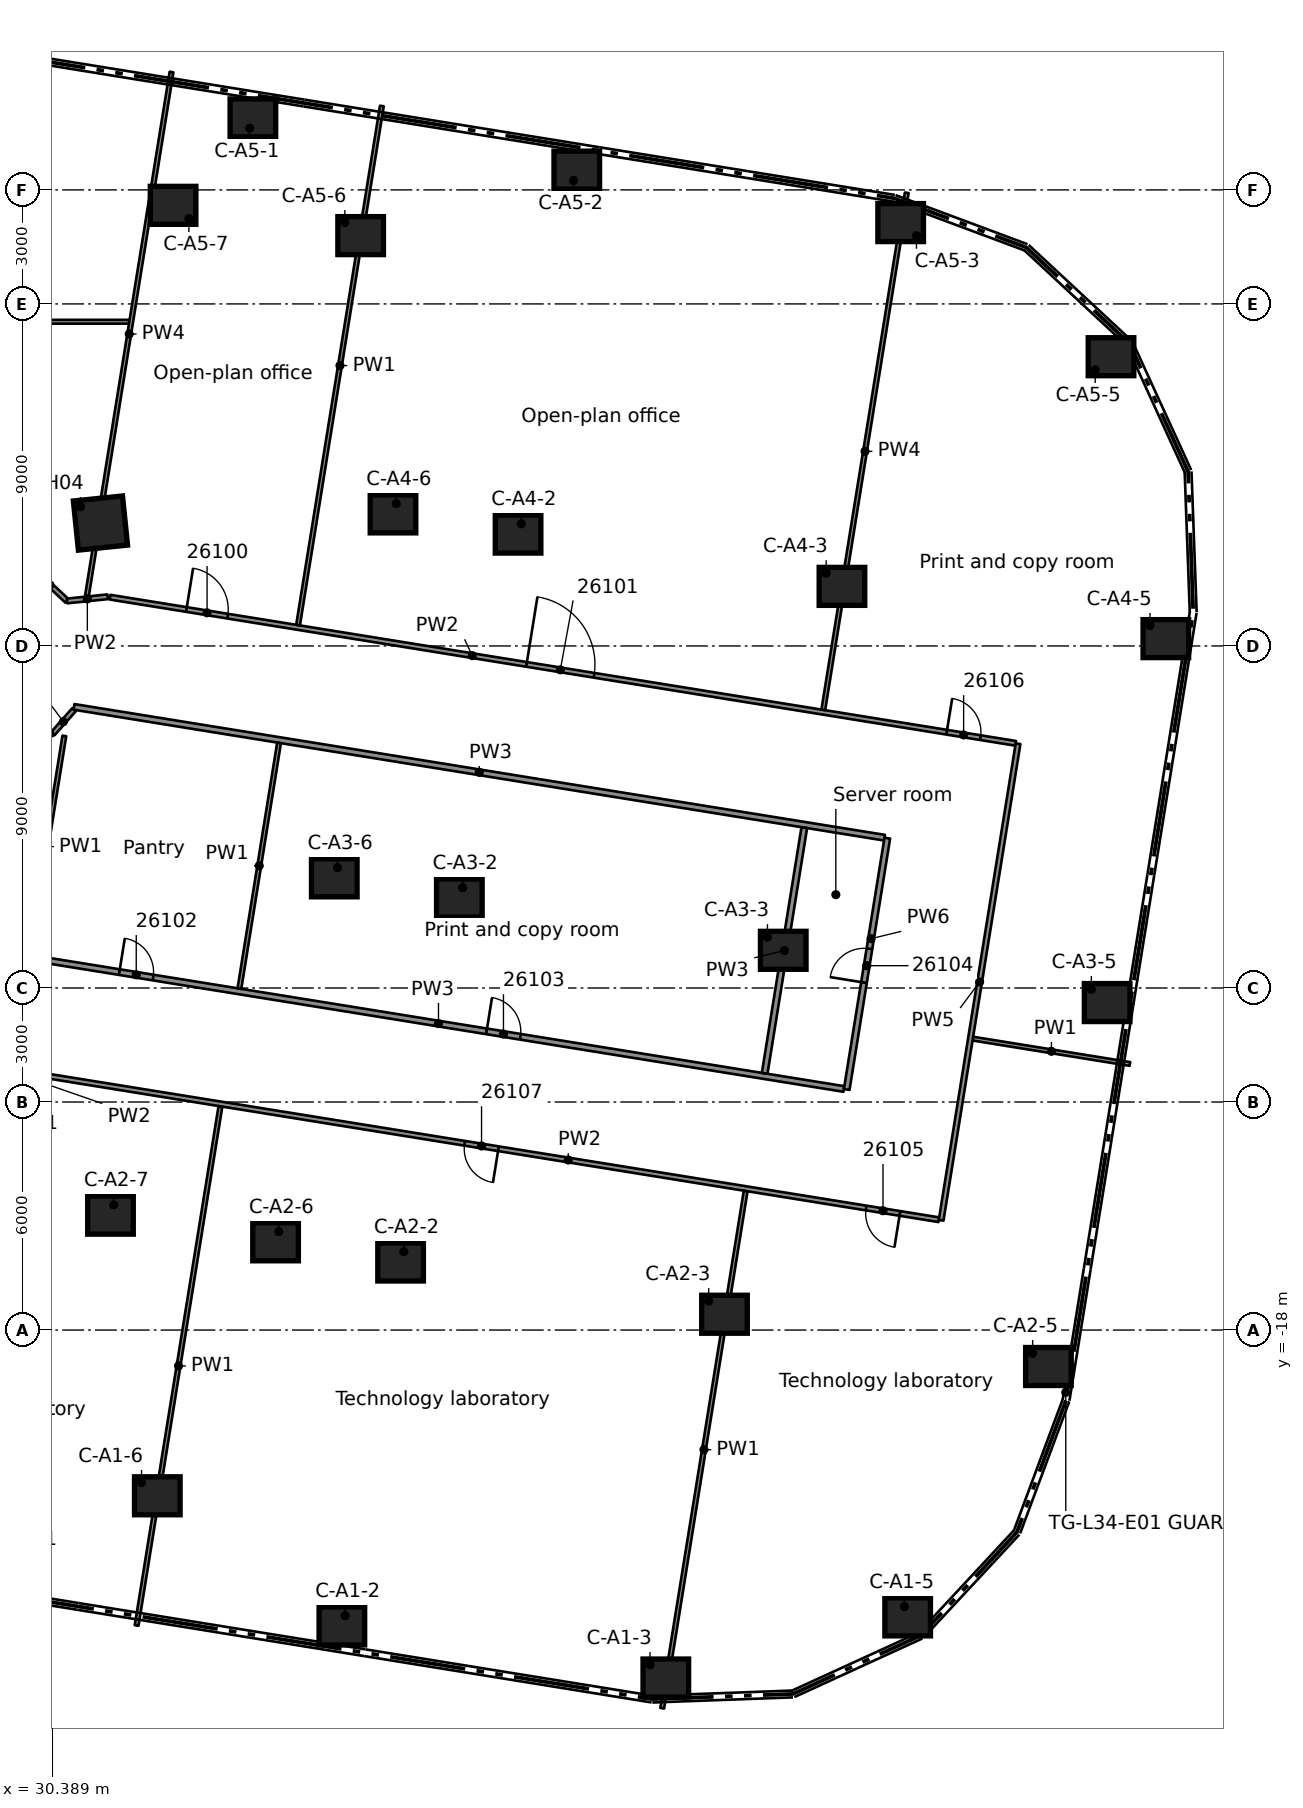
"""IFC4 building model, lengths in metres.
Left out: names, types, materials, properties, quantities, classifications, styles, units other than length and angle.
Written with IfcOpenShell. Run it as: python <this file> out.ifc"""

import sys

from ifc_helpers import new_model, si_unit, direction, frame, frame_2d, origin, origin_2d, place, context, subcontext, project, spatial, rectangle, extrude, element, fill, save


model = new_model("IFC4")
c1 = context("Model", 3, precision=1e-05, world=origin(), true_north=direction((0.0, 1.0)))
c2 = subcontext(c1, "Body", "Model", "MODEL_VIEW")
j1 = project(units=[si_unit("LENGTHUNIT", "METRE"), si_unit("PLANEANGLEUNIT", "RADIAN")], contexts=[c1])
p1 = place(None, origin())
s1 = spatial("IfcSite", under=j1, at=p1, CompositionType="ELEMENT")
p2 = place(p1, origin())
s2 = spatial("IfcBuilding", under=s1, at=p2, CompositionType="ELEMENT")
p3 = place(p2, frame((0.0, 0.0, 134.2)))
s3 = spatial("IfcBuildingStorey", under=s2, at=p3, CompositionType="ELEMENT", Elevation=134.2)
for number, where, z_axis, x_axis in (
    (1, (38.011, -25.785, 0.0), (0.0, 0.0, 1.0), (1.0, 0.0, 0.0)),
    (2, (46.535, -27.156, 0.0), (0.0, 0.0, 1.0), (1.0, 0.0, 0.0)),
    (3, (52.899, -25.547, 0.0), (0.0, 0.0, 1.0), (1.0, 0.0, 0.0)),
    (4, (33.154, -22.361, 0.0), (0.0, 0.0, 1.0), (1.0, 0.0, 0.0)),
    (5, (39.556, -16.209, 0.0), (0.0, 0.0, 1.0), (1.0, 0.0, 0.0)),
    (6, (48.079, -17.584, 0.0), (0.0, 0.0, 1.0), (1.0, 0.0, 0.0)),
    (7, (56.603, -18.959, 0.0), (0.0, 0.0, 1.0), (1.0, 0.0, 0.0)),
    (8, (36.266, -15.678, 0.0), (0.0, 0.0, 1.0), (1.0, 0.0, 0.0)),
    (9, (31.922, -14.977, 0.0), (0.0, 0.0, 1.0), (1.0, 0.0, 0.0)),
    (10, (41.102, -6.632, 0.0), (0.0, 0.0, 1.0), (1.0, 0.0, 0.0)),
    (11, (49.625, -8.008, 0.0), (0.0, 0.0, 1.0), (1.0, 0.0, 0.0)),
    (12, (58.148, -9.383, 0.0), (0.0, 0.0, 1.0), (1.0, 0.0, 0.0)),
    (13, (37.811, -6.101, 0.0), (0.0, 0.0, 1.0), (1.0, 0.0, 0.0)),
    (14, (42.647, 2.944, 0.0), (0.0, 0.0, 1.0), (1.0, 0.0, 0.0)),
    (15, (51.17, 1.568, 0.0), (0.0, 0.0, 1.0), (1.0, 0.0, 0.0)),
    (16, (59.693, 0.193, 0.0), (0.0, 0.0, 1.0), (1.0, 0.0, 0.0)),
    (17, (39.356, 3.475, 0.0), (0.0, 0.0, 1.0), (1.0, 0.0, 0.0)),
    (18, (35.669, 13.895, 0.0), (0.0, 0.0, 1.0), (1.0, 0.0, 0.0)),
    (19, (44.192, 12.52, 0.0), (0.0, 0.0, 1.0), (1.0, 0.0, 0.0)),
    (20, (52.715, 11.14, 0.0), (0.0, 0.0, 1.0), (1.0, 0.0, 0.0)),
    (21, (58.25, 7.611, 0.0), (0.0, 0.0, 1.0), (1.0, 0.0, 0.0)),
    (22, (38.505, 10.797, 0.0), (0.0, 0.0, 1.0), (1.0, 0.0, 0.0)),
    (23, (33.569, 11.594, 0.0), (0.0, 0.0, 1.0), (1.0, 0.0, 0.0)),
):
    element("IfcColumn", number, at=place(p3, frame(where, z_axis=z_axis, x_axis=x_axis)), inside=s3, PredefinedType="COLUMN", context=c2, shape_type="SweptSolid", body=[
        extrude(rectangle(XDim=1.2, YDim=1.0, at=origin_2d()), origin(), (0.0, 0.0, 1.0), 3.5),
    ])
p4 = place(p3, frame((31.658, 3.234, 0.0), z_axis=(0.0, 0.0, 1.0), x_axis=(0.994822339568, 0.101629290543, 0.0)))
e24 = element("IfcColumn", 24, at=p4, inside=s3, PredefinedType="COLUMN", context=c2, shape_type="SweptSolid", body=[
    extrude(rectangle(XDim=1.3, YDim=1.3, at=origin_2d()), origin(), (0.0, 0.0, 1.0), 3.5),
])
p5 = place(p3, frame((29.883, 2.025, 0.0), z_axis=(0.0, 0.0, 1.0), x_axis=(0.729202519841, -0.684297950499, 0.0)))
e25 = element("IfcWall", 25, at=p5, inside=s3, PredefinedType="PARTITIONING", context=c2, shape_type="SweptSolid", body=[
    extrude(rectangle(XDim=1.229, YDim=0.125, at=frame_2d((0.614, 0.0))), origin(), (0.0, 0.0, 1.0), 3.03),
])
p6 = place(p3, frame((30.962, -1.678, 0.0), z_axis=(0.0, 0.0, 1.0), x_axis=(-0.66286801914, -0.748736261444, 0.0)))
e26 = element("IfcWall", 26, at=p6, inside=s3, PredefinedType="PARTITIONING", context=c2, shape_type="SweptSolid", body=[
    extrude(rectangle(XDim=0.842, YDim=0.125, at=frame_2d((0.421, 0.0))), origin(), (0.0, 0.0, 1.0), 3.03),
])
p7 = place(p3, frame((53.72, -15.097, 0.0), z_axis=(0.0, 0.0, 1.0), x_axis=(-0.987256807208, 0.159135152063, 0.0)))
e27 = element("IfcWall", 27, at=p7, inside=s3, PredefinedType="PARTITIONING", context=c2, shape_type="SweptSolid", body=[
    extrude(rectangle(XDim=24.696, YDim=0.125, at=frame_2d((12.348, 0.0))), origin(), (0.0, 0.0, 1.0), 3.03),
])
p8 = place(p7, frame((1.039, 0.0, 0.0)))
e28 = element("IfcOpeningElement", 28, at=p8, cuts=e27, PredefinedType="OPENING", context=c2, shape_type="SweptSolid", body=[
    extrude(rectangle(XDim=0.9, YDim=2.1, at=frame_2d((0.45, 1.05))), frame((0.0, 0.073, 0.0), z_axis=(0.0, -1.0, 0.0), x_axis=(1.0, 0.0, 0.0)), (0.0, 0.0, 1.0), 0.145),
])
p9 = place(p7, frame((11.739, 0.0, 0.0)))
e29 = element("IfcOpeningElement", 29, at=p9, cuts=e27, PredefinedType="OPENING", context=c2, shape_type="SweptSolid", body=[
    extrude(rectangle(XDim=0.9, YDim=2.1, at=frame_2d((0.45, 1.05))), frame((0.0, 0.073, 0.0), z_axis=(0.0, -1.0, 0.0), x_axis=(1.0, 0.0, 0.0)), (0.0, 0.0, 1.0), 0.145),
])
p10 = place(p3, frame((29.885, -8.215, 0.0), z_axis=(0.0, 0.0, 1.0), x_axis=(0.987236652076, -0.1592601419, 0.0)))
e30 = element("IfcWall", 30, at=p10, inside=s3, PredefinedType="PARTITIONING", context=c2, shape_type="SweptSolid", body=[
    extrude(rectangle(XDim=21.612, YDim=0.15, at=frame_2d((10.806, 0.0))), origin(), (0.0, 0.0, 1.0), 3.03),
])
p11 = place(p10, frame((2.3, 0.0, 0.0)))
e31 = element("IfcOpeningElement", 31, at=p11, cuts=e30, PredefinedType="OPENING", context=c2, shape_type="SweptSolid", body=[
    extrude(rectangle(XDim=0.9, YDim=2.1, at=frame_2d((0.45, 1.05))), frame((0.0, 0.085, 0.0), z_axis=(0.0, -1.0, 0.0), x_axis=(1.0, 0.0, 0.0)), (0.0, 0.0, 1.0), 0.17),
])
p12 = place(p10, frame((12.088, 0.0, 0.0)))
e32 = element("IfcOpeningElement", 32, at=p12, cuts=e30, PredefinedType="OPENING", context=c2, shape_type="SweptSolid", body=[
    extrude(rectangle(XDim=0.9, YDim=2.1, at=frame_2d((0.45, 1.05))), frame((0.0, 0.085, 0.0), z_axis=(0.0, -1.0, 0.0), x_axis=(1.0, 0.0, 0.0)), (0.0, 0.0, 1.0), 0.17),
])
p13 = place(p3, frame((54.615, -10.332, 0.0), z_axis=(0.0, 0.0, 1.0), x_axis=(0.987227218169, -0.15931861067, 0.0)))
e33 = element("IfcWall", 33, at=p13, inside=s3, PredefinedType="PARTITIONING", context=c2, shape_type="SweptSolid", body=[
    extrude(rectangle(XDim=4.187, YDim=0.1, at=frame_2d((2.093, 0.0))), origin(), (0.0, 0.0, 1.0), 3.03),
])
p14 = place(p3, frame((30.961, -1.603, 0.0), z_axis=(0.0, 0.0, 1.0), x_axis=(0.987228625593, -0.159309889241, 0.0)))
e34 = element("IfcWall", 34, at=p14, inside=s3, PredefinedType="PARTITIONING", context=c2, shape_type="SweptSolid", body=[
    extrude(rectangle(XDim=21.605, YDim=0.15, at=frame_2d((10.802, 0.0))), origin(), (0.0, 0.0, 1.0), 3.03),
])
p15 = place(p3, frame((31.909, 1.284, 0.0), z_axis=(0.0, 0.0, 1.0), x_axis=(0.987227629246, -0.159316063386, 0.0)))
e35 = element("IfcWall", 35, at=p15, inside=s3, PredefinedType="PARTITIONING", context=c2, shape_type="SweptSolid", body=[
    extrude(rectangle(XDim=24.14, YDim=0.125, at=frame_2d((12.07, 0.0))), origin(), (0.0, 0.0, 1.0), 3.03),
])
p16 = place(p15, frame((2.038, 0.0, 0.0)))
e36 = element("IfcOpeningElement", 36, at=p16, cuts=e35, PredefinedType="OPENING", context=c2, shape_type="SweptSolid", body=[
    extrude(rectangle(XDim=1.1, YDim=2.1, at=frame_2d((0.55, 1.05))), frame((0.0, 0.073, 0.0), z_axis=(0.0, -1.0, 0.0), x_axis=(1.0, 0.0, 0.0)), (0.0, 0.0, 1.0), 0.145),
])
p17 = place(p15, frame((11.103, 0.0, 0.0)))
e37 = element("IfcOpeningElement", 37, at=p17, cuts=e35, PredefinedType="OPENING", context=c2, shape_type="SweptSolid", body=[
    extrude(rectangle(XDim=1.8, YDim=2.1, at=frame_2d((0.9, 1.05))), frame((0.0, 0.073, 0.0), z_axis=(0.0, -1.0, 0.0), x_axis=(1.0, 0.0, 0.0)), (0.0, 0.0, 1.0), 0.145),
])
p18 = place(p15, frame((22.303, 0.0, 0.0)))
e38 = element("IfcOpeningElement", 38, at=p18, cuts=e35, PredefinedType="OPENING", context=c2, shape_type="SweptSolid", body=[
    extrude(rectangle(XDim=0.9, YDim=2.1, at=frame_2d((0.45, 1.05))), frame((0.0, 0.073, 0.0), z_axis=(0.0, -1.0, 0.0), x_axis=(1.0, 0.0, 0.0)), (0.0, 0.0, 1.0), 0.145),
])
p19 = place(p3, frame((22.113, 8.531, 0.0), z_axis=(0.0, 0.0, 1.0), x_axis=(1.0, 0.0, 0.0)))
e39 = element("IfcWall", 39, at=p19, inside=s3, PredefinedType="PARTITIONING", context=c2, shape_type="SweptSolid", body=[
    extrude(rectangle(XDim=10.304, YDim=0.1, at=frame_2d((5.152, 0.0))), origin(), (0.0, 0.0, 1.0), 3.03),
])
p20 = place(p3, frame((22.113, -2.386, 0.0), z_axis=(0.0, 0.0, 1.0), x_axis=(0.9999558849, 0.009392989614, 0.0)))
e40 = element("IfcWall", 40, at=p20, inside=s3, PredefinedType="PARTITIONING", context=c2, shape_type="SweptSolid", body=[
    extrude(rectangle(XDim=8.291, YDim=0.125, at=frame_2d((4.146, 0.0))), origin(), (0.0, 0.0, 1.0), 3.03),
])
p21 = place(p3, frame((31.847, 1.294, 0.0), z_axis=(0.0, 0.0, 1.0), x_axis=(-0.994749429213, -0.102340476256, 0.0)))
e41 = element("IfcWall", 41, at=p21, inside=s3, PredefinedType="PARTITIONING", context=c2, shape_type="SweptSolid", body=[
    extrude(rectangle(XDim=1.073, YDim=0.125, at=frame_2d((0.537, 0.0))), origin(), (0.0, 0.0, 1.0), 3.03),
])
p22 = place(p3, frame((53.78, -15.111, 0.0), z_axis=(0.0, 0.0, 1.0), x_axis=(0.159347260632, 0.987222594215, 0.0)))
e42 = element("IfcWall", 42, at=p22, inside=s3, PredefinedType="PARTITIONING", context=c2, shape_type="SweptSolid", body=[
    extrude(rectangle(XDim=12.701, YDim=0.125, at=frame_2d((6.351, 0.0))), origin(), (0.0, 0.0, 1.0), 2.419),
])
p23 = place(p3, frame((51.295, -11.67, 0.0), z_axis=(0.0, 0.0, 1.0), x_axis=(0.159450148398, 0.987205981635, 0.0)))
e43 = element("IfcWall", 43, at=p23, inside=s3, PredefinedType="PARTITIONING", context=c2, shape_type="SweptSolid", body=[
    extrude(rectangle(XDim=6.699, YDim=0.15, at=frame_2d((3.349, 0.0))), origin(), (0.0, 0.0, 1.0), 2.419),
])
p24 = place(p23, frame((2.85, 0.0, 0.0)))
e44 = element("IfcOpeningElement", 44, at=p24, cuts=e43, PredefinedType="OPENING", context=c2, shape_type="SweptSolid", body=[
    extrude(rectangle(XDim=0.9, YDim=2.1, at=frame_2d((0.45, 1.05))), frame((0.0, 0.085, 0.0), z_axis=(0.0, -1.0, 0.0), x_axis=(1.0, 0.0, 0.0)), (0.0, 0.0, 1.0), 0.17),
])
p25 = place(p3, frame((46.44, -27.951, 0.0), z_axis=(0.0, 0.0, 1.0), x_axis=(0.159329896372, 0.987225396818, 0.0)))
e45 = element("IfcWall", 45, at=p25, inside=s3, PredefinedType="PARTITIONING", context=c2, shape_type="SweptSolid", body=[
    extrude(rectangle(XDim=13.783, YDim=0.1, at=frame_2d((6.892, 0.0))), origin(), (0.0, 0.0, 1.0), 3.03),
])
p26 = place(p3, frame((49.136, -11.246, 0.0), z_axis=(0.0, 0.0, 1.0), x_axis=(0.159264085933, 0.98723601582, 0.0)))
e46 = element("IfcWall", 46, at=p26, inside=s3, PredefinedType="PARTITIONING", context=c2, shape_type="SweptSolid", body=[
    extrude(rectangle(XDim=6.549, YDim=0.15, at=frame_2d((3.274, 0.0))), origin(), (0.0, 0.0, 1.0), 3.03),
])
p27 = place(p3, frame((50.679, -1.682, 0.0), z_axis=(0.0, 0.0, 1.0), x_axis=(0.159341041875, 0.987223597963, 0.0)))
e47 = element("IfcWall", 47, at=p27, inside=s3, PredefinedType="PARTITIONING", context=c2, shape_type="SweptSolid", body=[
    extrude(rectangle(XDim=13.782, YDim=0.1, at=frame_2d((6.891, 0.0))), origin(), (0.0, 0.0, 1.0), 2.395),
])
p28 = place(p3, frame((32.61, -25.774, 0.0), z_axis=(0.0, 0.0, 1.0), x_axis=(0.159346714874, 0.987222682306, 0.0)))
e48 = element("IfcWall", 48, at=p28, inside=s3, PredefinedType="PARTITIONING", context=c2, shape_type="SweptSolid", body=[
    extrude(rectangle(XDim=13.837, YDim=0.1, at=frame_2d((6.918, 0.0))), origin(), (0.0, 0.0, 1.0), 3.03),
])
p29 = place(p3, frame((35.315, -9.015, 0.0), z_axis=(0.0, 0.0, 1.0), x_axis=(0.159269947871, 0.987235070135, 0.0)))
e49 = element("IfcWall", 49, at=p29, inside=s3, PredefinedType="PARTITIONING", context=c2, shape_type="SweptSolid", body=[
    extrude(rectangle(XDim=6.548, YDim=0.1, at=frame_2d((3.274, 0.0))), origin(), (0.0, 0.0, 1.0), 3.03),
])
p30 = place(p3, frame((36.858, 0.549, 0.0), z_axis=(0.0, 0.0, 1.0), x_axis=(0.159375015721, 0.987218113876, 0.0)))
e50 = element("IfcWall", 50, at=p30, inside=s3, PredefinedType="PARTITIONING", context=c2, shape_type="SweptSolid", body=[
    extrude(rectangle(XDim=13.836, YDim=0.1, at=frame_2d((6.918, 0.0))), origin(), (0.0, 0.0, 1.0), 3.03),
])
p31 = place(p3, frame((29.769, -8.19, 0.0), z_axis=(0.0, 0.0, 1.0), x_axis=(0.159194698691, 0.987247207091, 0.0)))
e51 = element("IfcWall", 51, at=p31, inside=s3, PredefinedType="PARTITIONING", context=c2, shape_type="SweptSolid", body=[
    extrude(rectangle(XDim=5.898, YDim=0.1, at=frame_2d((2.949, 0.0))), origin(), (0.0, 0.0, 1.0), 3.03),
])
p32 = place(p3, frame((31.302, 1.314, 0.0), z_axis=(0.0, 0.0, 1.0), x_axis=(0.159396223654, 0.987214689865, 0.0)))
e52 = element("IfcWall", 52, at=p32, inside=s3, PredefinedType="PARTITIONING", context=c2, shape_type="SweptSolid", body=[
    extrude(rectangle(XDim=13.966, YDim=0.1, at=frame_2d((6.983, 0.0))), origin(), (0.0, 0.0, 1.0), 2.395),
])
p33 = place(p16, origin())
e53 = element("IfcDoor", 53, at=p33, inside=s3, OperationType="SINGLE_SWING_LEFT", PredefinedType="DOOR", context=c2, shape_type="SweptSolid", body=[
    extrude(rectangle(XDim=1.1, YDim=2.1, at=frame_2d((0.55, 1.05))), frame((0.0, 0.025, 0.0), z_axis=(0.0, -1.0, 0.0), x_axis=(1.0, 0.0, 0.0)), (0.0, 0.0, 1.0), 0.05),
])
fill(e36, e53)
p34 = place(p17, origin())
e54 = element("IfcDoor", 54, at=p34, inside=s3, OperationType="DOUBLE_DOOR_SINGLE_SWING", PredefinedType="DOOR", context=c2, shape_type="SweptSolid", body=[
    extrude(rectangle(XDim=1.8, YDim=2.1, at=frame_2d((0.9, 1.05))), frame((0.0, 0.025, 0.0), z_axis=(0.0, -1.0, 0.0), x_axis=(1.0, 0.0, 0.0)), (0.0, 0.0, 1.0), 0.05),
])
fill(e37, e54)
p35 = place(p11, origin())
e55 = element("IfcDoor", 55, at=p35, inside=s3, OperationType="SINGLE_SWING_LEFT", PredefinedType="DOOR", context=c2, shape_type="SweptSolid", body=[
    extrude(rectangle(XDim=0.9, YDim=2.1, at=frame_2d((0.45, 1.05))), frame((0.0, 0.025, 0.0), z_axis=(0.0, -1.0, 0.0), x_axis=(1.0, 0.0, 0.0)), (0.0, 0.0, 1.0), 0.05),
])
fill(e31, e55)
p36 = place(p12, origin())
e56 = element("IfcDoor", 56, at=p36, inside=s3, OperationType="SINGLE_SWING_RIGHT", PredefinedType="DOOR", context=c2, shape_type="SweptSolid", body=[
    extrude(rectangle(XDim=0.9, YDim=2.1, at=frame_2d((0.45, 1.05))), frame((0.0, 0.025, 0.0), z_axis=(0.0, -1.0, 0.0), x_axis=(1.0, 0.0, 0.0)), (0.0, 0.0, 1.0), 0.05),
])
fill(e32, e56)
p37 = place(p24, origin())
e57 = element("IfcDoor", 57, at=p37, inside=s3, OperationType="SINGLE_SWING_LEFT", PredefinedType="DOOR", context=c2, shape_type="SweptSolid", body=[
    extrude(rectangle(XDim=0.9, YDim=2.1, at=frame_2d((0.45, 1.05))), frame((0.0, 0.025, 0.0), z_axis=(0.0, -1.0, 0.0), x_axis=(1.0, 0.0, 0.0)), (0.0, 0.0, 1.0), 0.05),
])
fill(e44, e57)
p38 = place(p8, origin())
e58 = element("IfcDoor", 58, at=p38, inside=s3, OperationType="SINGLE_SWING_LEFT", PredefinedType="DOOR", context=c2, shape_type="SweptSolid", body=[
    extrude(rectangle(XDim=0.9, YDim=2.1, at=frame_2d((0.45, 1.05))), frame((0.0, 0.025, 0.0), z_axis=(0.0, -1.0, 0.0), x_axis=(1.0, 0.0, 0.0)), (0.0, 0.0, 1.0), 0.05),
])
fill(e28, e58)
p39 = place(p18, origin())
e59 = element("IfcDoor", 59, at=p39, inside=s3, OperationType="SINGLE_SWING_RIGHT", PredefinedType="DOOR", context=c2, shape_type="SweptSolid", body=[
    extrude(rectangle(XDim=0.9, YDim=2.1, at=frame_2d((0.45, 1.05))), frame((0.0, 0.025, 0.0), z_axis=(0.0, -1.0, 0.0), x_axis=(1.0, 0.0, 0.0)), (0.0, 0.0, 1.0), 0.05),
])
fill(e38, e59)
p40 = place(p9, origin())
e60 = element("IfcDoor", 60, at=p40, inside=s3, OperationType="SINGLE_SWING_LEFT", PredefinedType="DOOR", context=c2, shape_type="SweptSolid", body=[
    extrude(rectangle(XDim=0.9, YDim=2.1, at=frame_2d((0.45, 1.05))), frame((0.0, 0.025, 0.0), z_axis=(0.0, -1.0, 0.0), x_axis=(1.0, 0.0, 0.0)), (0.0, 0.0, 1.0), 0.05),
])
fill(e29, e60)
save(model, sys.argv[1])
